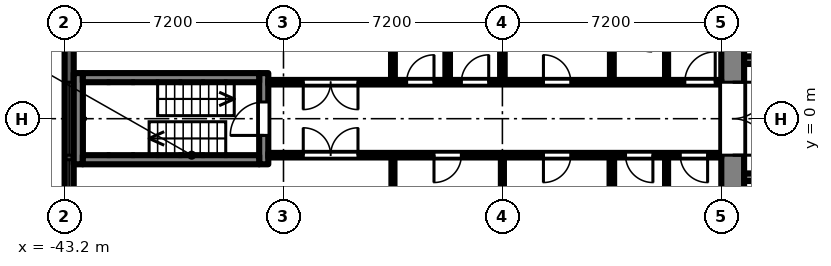
"""IFC4 building model, lengths in metres.
Left out: names, types, materials, properties, quantities, classifications, styles, units other than length and angle.
Written with IfcOpenShell. Run it as: python <this file> out.ifc"""

import sys

from ifc_helpers import new_model, si_unit, direction, frame, frame_2d, origin, place, context, subcontext, project, spatial, rectangle, extrude, element, fill, save


model = new_model("IFC4")
c1 = context("Model", 3, precision=1e-05, world=origin(), true_north=direction((0.0, 1.0)))
c2 = subcontext(c1, "Body", "Model", "MODEL_VIEW")
j1 = project(units=[si_unit("LENGTHUNIT", "METRE"), si_unit("PLANEANGLEUNIT", "RADIAN")], contexts=[c1])
p1 = place(None, origin())
s1 = spatial("IfcSite", under=j1, at=p1, CompositionType="ELEMENT")
p2 = place(p1, origin())
s2 = spatial("IfcBuilding", under=s1, at=p2, CompositionType="ELEMENT")
p3 = place(p2, frame((0.0, 0.0, 20.7)))
s3 = spatial("IfcBuildingStorey", under=s2, at=p3, CompositionType="ELEMENT", Elevation=20.7)
p4 = place(p3, frame((-43.05, 2.7, 0.0), z_axis=(0.0, 0.0, 1.0), x_axis=(0.0, -1.0, 0.0)))
e1 = element("IfcWall", 1, at=p4, inside=s3, PredefinedType="SOLIDWALL", context=c2, shape_type="SweptSolid", body=[
    extrude(rectangle(XDim=5.4, YDim=0.3, at=frame_2d((2.7, 0.0))), origin(), (0.0, 0.0, 1.0), 2.1),
])
p5 = place(p4, frame((1.5, 0.0, 0.2)))
e2 = element("IfcOpeningElement", 2, at=p5, cuts=e1, PredefinedType="OPENING", context=c2, shape_type="SweptSolid", body=[
    extrude(rectangle(XDim=2.4, YDim=1.85, at=frame_2d((1.2, 0.925))), frame((0.0, 0.16, 0.0), z_axis=(0.0, -1.0, 0.0), x_axis=(1.0, 0.0, 0.0)), (0.0, 0.0, 1.0), 0.32),
])
p6 = place(p4, frame((4.05, 0.0, 0.2)))
e3 = element("IfcOpeningElement", 3, at=p6, cuts=e1, PredefinedType="OPENING", context=c2, shape_type="SweptSolid", body=[
    extrude(rectangle(XDim=1.2, YDim=1.85, at=frame_2d((0.6, 0.925))), frame((0.0, 0.16, 0.0), z_axis=(0.0, -1.0, 0.0), x_axis=(1.0, 0.0, 0.0)), (0.0, 0.0, 1.0), 0.32),
])
p7 = place(p3, frame((-21.225, -7.2, 0.0), z_axis=(0.0, 0.0, 1.0), x_axis=(0.0, 1.0, 0.0)))
e4 = element("IfcWall", 4, at=p7, inside=s3, PredefinedType="SHEAR", context=c2, shape_type="SweptSolid", body=[
    extrude(rectangle(XDim=14.4, YDim=0.75, at=frame_2d((7.2, 0.0))), origin(), (0.0, 0.0, 1.0), 2.575),
])
p8 = place(p7, frame((6.0, 0.0, 0.0)))
e5 = element("IfcOpeningElement", 5, at=p8, cuts=e4, PredefinedType="OPENING", context=c2, shape_type="SweptSolid", body=[
    extrude(rectangle(XDim=2.4, YDim=2.2, at=frame_2d((1.2, 1.1))), frame((0.0, 0.385, 0.0), z_axis=(0.0, -1.0, 0.0), x_axis=(1.0, 0.0, 0.0)), (0.0, 0.0, 1.0), 0.77),
])
p9 = place(p3, frame((-7.9, 1.925, 0.0), z_axis=(0.0, 0.0, 1.0), x_axis=(-1.0, 0.0, 0.0)))
e6 = element("IfcWall", 6, at=p9, inside=s3, PredefinedType="SHEAR", context=c2, shape_type="SweptSolid", body=[
    extrude(rectangle(XDim=12.95, YDim=0.25, at=frame_2d((6.475, 0.0))), origin(), (0.0, 0.0, 1.0), 2.575),
])
p10 = place(p9, frame((0.525, 0.0, 0.0)))
e7 = element("IfcOpeningElement", 7, at=p10, cuts=e6, PredefinedType="OPENING", context=c2, shape_type="SweptSolid", body=[
    extrude(rectangle(XDim=0.9, YDim=2.1, at=frame_2d((0.45, 1.05))), frame((0.0, 0.135, 0.0), z_axis=(0.0, -1.0, 0.0), x_axis=(1.0, 0.0, 0.0)), (0.0, 0.0, 1.0), 0.27),
])
p11 = place(p9, frame((2.625, 0.0, 0.0)))
e8 = element("IfcOpeningElement", 8, at=p11, cuts=e6, PredefinedType="OPENING", context=c2, shape_type="SweptSolid", body=[
    extrude(rectangle(XDim=1.1, YDim=2.1, at=frame_2d((0.55, 1.05))), frame((0.0, 0.135, 0.0), z_axis=(0.0, -1.0, 0.0), x_axis=(1.0, 0.0, 0.0)), (0.0, 0.0, 1.0), 0.27),
])
p12 = place(p9, frame((4.925, 0.0, 0.0)))
e9 = element("IfcOpeningElement", 9, at=p12, cuts=e6, PredefinedType="OPENING", context=c2, shape_type="SweptSolid", body=[
    extrude(rectangle(XDim=0.9, YDim=2.1, at=frame_2d((0.45, 1.05))), frame((0.0, 0.135, 0.0), z_axis=(0.0, -1.0, 0.0), x_axis=(1.0, 0.0, 0.0)), (0.0, 0.0, 1.0), 0.27),
])
p13 = place(p9, frame((8.225, 0.0, 0.0)))
e10 = element("IfcOpeningElement", 10, at=p13, cuts=e6, PredefinedType="OPENING", context=c2, shape_type="SweptSolid", body=[
    extrude(rectangle(XDim=0.9, YDim=2.1, at=frame_2d((0.45, 1.05))), frame((0.0, 0.135, 0.0), z_axis=(0.0, -1.0, 0.0), x_axis=(1.0, 0.0, 0.0)), (0.0, 0.0, 1.0), 0.27),
])
p14 = place(p3, frame((-7.9, -1.925, 0.0), z_axis=(0.0, 0.0, 1.0), x_axis=(-1.0, 0.0, 0.0)))
e11 = element("IfcWall", 11, at=p14, inside=s3, PredefinedType="SHEAR", context=c2, shape_type="SweptSolid", body=[
    extrude(rectangle(XDim=12.95, YDim=0.25, at=frame_2d((6.475, 0.0))), origin(), (0.0, 0.0, 1.0), 2.575),
])
p15 = place(p14, frame((4.825, 0.0, 0.0)))
e12 = element("IfcOpeningElement", 12, at=p15, cuts=e11, PredefinedType="OPENING", context=c2, shape_type="SweptSolid", body=[
    extrude(rectangle(XDim=1.1, YDim=2.1, at=frame_2d((0.55, 1.05))), frame((0.0, 0.135, 0.0), z_axis=(0.0, -1.0, 0.0), x_axis=(1.0, 0.0, 0.0)), (0.0, 0.0, 1.0), 0.27),
])
p16 = place(p14, frame((7.025, 0.0, 0.0)))
e13 = element("IfcOpeningElement", 13, at=p16, cuts=e11, PredefinedType="OPENING", context=c2, shape_type="SweptSolid", body=[
    extrude(rectangle(XDim=1.1, YDim=2.1, at=frame_2d((0.55, 1.05))), frame((0.0, 0.135, 0.0), z_axis=(0.0, -1.0, 0.0), x_axis=(1.0, 0.0, 0.0)), (0.0, 0.0, 1.0), 0.27),
])
p17 = place(p14, frame((9.225, 0.0, 0.0)))
e14 = element("IfcOpeningElement", 14, at=p17, cuts=e11, PredefinedType="OPENING", context=c2, shape_type="SweptSolid", body=[
    extrude(rectangle(XDim=1.1, YDim=2.1, at=frame_2d((0.55, 1.05))), frame((0.0, 0.135, 0.0), z_axis=(0.0, -1.0, 0.0), x_axis=(1.0, 0.0, 0.0)), (0.0, 0.0, 1.0), 0.27),
])
p18 = place(p14, frame((0.525, 0.0, 0.0)))
e15 = element("IfcOpeningElement", 15, at=p18, cuts=e11, PredefinedType="OPENING", context=c2, shape_type="SweptSolid", body=[
    extrude(rectangle(XDim=0.9, YDim=2.1, at=frame_2d((0.45, 1.05))), frame((0.0, 0.135, 0.0), z_axis=(0.0, -1.0, 0.0), x_axis=(1.0, 0.0, 0.0)), (0.0, 0.0, 1.0), 0.27),
])
p19 = place(p14, frame((2.625, 0.0, 0.0)))
e16 = element("IfcOpeningElement", 16, at=p19, cuts=e11, PredefinedType="OPENING", context=c2, shape_type="SweptSolid", body=[
    extrude(rectangle(XDim=1.1, YDim=2.1, at=frame_2d((0.55, 1.05))), frame((0.0, 0.135, 0.0), z_axis=(0.0, -1.0, 0.0), x_axis=(1.0, 0.0, 0.0)), (0.0, 0.0, 1.0), 0.27),
])
p20 = place(p3, frame((-36.65, -1.5, 0.0), z_axis=(0.0, 0.0, 1.0), x_axis=(0.0, 1.0, 0.0)))
e17 = element("IfcWall", 17, at=p20, inside=s3, PredefinedType="SHEAR", context=c2, shape_type="SweptSolid", body=[
    extrude(rectangle(XDim=3.0, YDim=0.3, at=frame_2d((1.5, 0.0))), origin(), (0.0, 0.0, 1.0), 2.575),
])
p21 = place(p20, frame((0.95, 0.0, 0.0)))
e18 = element("IfcOpeningElement", 18, at=p21, cuts=e17, PredefinedType="OPENING", context=c2, shape_type="SweptSolid", body=[
    extrude(rectangle(XDim=1.1, YDim=2.1, at=frame_2d((0.55, 1.05))), frame((0.0, 0.16, 0.0), z_axis=(0.0, -1.0, 0.0), x_axis=(1.0, 0.0, 0.0)), (0.0, 0.0, 1.0), 0.32),
])
p22 = place(p3, frame((-42.75, -1.5, 0.0), z_axis=(0.0, 0.0, 1.0), x_axis=(0.0, 1.0, 0.0)))
e19 = element("IfcWall", 19, at=p22, inside=s3, PredefinedType="SHEAR", context=c2, shape_type="SweptSolid", body=[
    extrude(rectangle(XDim=3.0, YDim=0.3, at=frame_2d((1.5, 0.0))), origin(), (0.0, 0.0, 1.0), 2.575),
])
for number, where, z_axis, x_axis in (
    (20, (-36.8, -1.35, 0.0), (0.0, 0.0, 1.0), (-1.0, 0.0, 0.0)),
    (21, (-36.8, 1.35, 0.0), (0.0, 0.0, 1.0), (-1.0, 0.0, 0.0)),
):
    element("IfcWall", number, at=place(p3, frame(where, z_axis=z_axis, x_axis=x_axis)), inside=s3, PredefinedType="SHEAR", context=c2, shape_type="SweptSolid", body=[
        extrude(rectangle(XDim=5.8, YDim=0.3, at=frame_2d((2.9, 0.0))), origin(), (0.0, 0.0, 1.0), 2.575),
    ])
p23 = place(p3, frame((-36.5, -1.2, 0.0), z_axis=(0.0, 0.0, 1.0), x_axis=(1.0, 0.0, 0.0)))
e22 = element("IfcWall", 22, at=p23, inside=s3, PredefinedType="PARTITIONING", context=c2, shape_type="SweptSolid", body=[
    extrude(rectangle(XDim=14.9, YDim=0.15, at=frame_2d((7.45, 0.0))), origin(), (0.0, 0.0, 1.0), 2.575),
])
p24 = place(p23, frame((13.55, 0.0, 0.0)))
e23 = element("IfcOpeningElement", 23, at=p24, cuts=e22, PredefinedType="OPENING", context=c2, shape_type="SweptSolid", body=[
    extrude(rectangle(XDim=0.9, YDim=2.1, at=frame_2d((0.45, 1.05))), frame((0.0, 0.085, 0.0), z_axis=(0.0, -1.0, 0.0), x_axis=(1.0, 0.0, 0.0)), (0.0, 0.0, 1.0), 0.17),
])
p25 = place(p23, frame((11.75, 0.0, 0.0)))
e24 = element("IfcOpeningElement", 24, at=p25, cuts=e22, PredefinedType="OPENING", context=c2, shape_type="SweptSolid", body=[
    extrude(rectangle(XDim=0.9, YDim=2.1, at=frame_2d((0.45, 1.05))), frame((0.0, 0.085, 0.0), z_axis=(0.0, -1.0, 0.0), x_axis=(1.0, 0.0, 0.0)), (0.0, 0.0, 1.0), 0.17),
])
p26 = place(p23, frame((9.05, 0.0, 0.0)))
e25 = element("IfcOpeningElement", 25, at=p26, cuts=e22, PredefinedType="OPENING", context=c2, shape_type="SweptSolid", body=[
    extrude(rectangle(XDim=0.9, YDim=2.1, at=frame_2d((0.45, 1.05))), frame((0.0, 0.085, 0.0), z_axis=(0.0, -1.0, 0.0), x_axis=(1.0, 0.0, 0.0)), (0.0, 0.0, 1.0), 0.17),
])
p27 = place(p23, frame((5.45, 0.0, 0.0)))
e26 = element("IfcOpeningElement", 26, at=p27, cuts=e22, PredefinedType="OPENING", context=c2, shape_type="SweptSolid", body=[
    extrude(rectangle(XDim=0.9, YDim=2.1, at=frame_2d((0.45, 1.05))), frame((0.0, 0.085, 0.0), z_axis=(0.0, -1.0, 0.0), x_axis=(1.0, 0.0, 0.0)), (0.0, 0.0, 1.0), 0.17),
])
p28 = place(p23, frame((1.15, 0.0, 0.0)))
e27 = element("IfcOpeningElement", 27, at=p28, cuts=e22, PredefinedType="OPENING", context=c2, shape_type="SweptSolid", body=[
    extrude(rectangle(XDim=1.8, YDim=2.1, at=frame_2d((0.9, 1.05))), frame((0.0, 0.085, 0.0), z_axis=(0.0, -1.0, 0.0), x_axis=(1.0, 0.0, 0.0)), (0.0, 0.0, 1.0), 0.17),
])
p29 = place(p3, frame((-36.5, 1.2, 0.0), z_axis=(0.0, 0.0, 1.0), x_axis=(1.0, 0.0, 0.0)))
e28 = element("IfcWall", 28, at=p29, inside=s3, PredefinedType="PARTITIONING", context=c2, shape_type="SweptSolid", body=[
    extrude(rectangle(XDim=14.9, YDim=0.15, at=frame_2d((7.45, 0.0))), origin(), (0.0, 0.0, 1.0), 2.575),
])
p30 = place(p29, frame((13.7, 0.0, 0.0)))
e29 = element("IfcOpeningElement", 29, at=p30, cuts=e28, PredefinedType="OPENING", context=c2, shape_type="SweptSolid", body=[
    extrude(rectangle(XDim=1.0, YDim=2.1, at=frame_2d((0.5, 1.05))), frame((0.0, 0.085, 0.0), z_axis=(0.0, -1.0, 0.0), x_axis=(1.0, 0.0, 0.0)), (0.0, 0.0, 1.0), 0.17),
])
p31 = place(p29, frame((9.05, 0.0, 0.0)))
e30 = element("IfcOpeningElement", 30, at=p31, cuts=e28, PredefinedType="OPENING", context=c2, shape_type="SweptSolid", body=[
    extrude(rectangle(XDim=0.9, YDim=2.1, at=frame_2d((0.45, 1.05))), frame((0.0, 0.085, 0.0), z_axis=(0.0, -1.0, 0.0), x_axis=(1.0, 0.0, 0.0)), (0.0, 0.0, 1.0), 0.17),
])
p32 = place(p29, frame((6.35, 0.0, 0.0)))
e31 = element("IfcOpeningElement", 31, at=p32, cuts=e28, PredefinedType="OPENING", context=c2, shape_type="SweptSolid", body=[
    extrude(rectangle(XDim=0.9, YDim=2.1, at=frame_2d((0.45, 1.05))), frame((0.0, 0.085, 0.0), z_axis=(0.0, -1.0, 0.0), x_axis=(1.0, 0.0, 0.0)), (0.0, 0.0, 1.0), 0.17),
])
p33 = place(p29, frame((4.55, 0.0, 0.0)))
e32 = element("IfcOpeningElement", 32, at=p33, cuts=e28, PredefinedType="OPENING", context=c2, shape_type="SweptSolid", body=[
    extrude(rectangle(XDim=0.9, YDim=2.1, at=frame_2d((0.45, 1.05))), frame((0.0, 0.085, 0.0), z_axis=(0.0, -1.0, 0.0), x_axis=(1.0, 0.0, 0.0)), (0.0, 0.0, 1.0), 0.17),
])
p34 = place(p29, frame((1.15, 0.0, 0.0)))
e33 = element("IfcOpeningElement", 33, at=p34, cuts=e28, PredefinedType="OPENING", context=c2, shape_type="SweptSolid", body=[
    extrude(rectangle(XDim=1.8, YDim=2.1, at=frame_2d((0.9, 1.05))), frame((0.0, 0.085, 0.0), z_axis=(0.0, -1.0, 0.0), x_axis=(1.0, 0.0, 0.0)), (0.0, 0.0, 1.0), 0.17),
])
p35 = place(p3, frame((-32.4, -6.9, 0.0), z_axis=(0.0, 0.0, 1.0), x_axis=(0.0, 1.0, 0.0)))
e34 = element("IfcWall", 34, at=p35, inside=s3, PredefinedType="PARTITIONING", context=c2, shape_type="SweptSolid", body=[
    extrude(rectangle(XDim=5.625, YDim=0.1, at=frame_2d((2.812, 0.0))), origin(), (0.0, 0.0, 1.0), 2.575),
])
p36 = place(p3, frame((-32.4, 1.275, 0.0), z_axis=(0.0, 0.0, 1.0), x_axis=(0.0, 1.0, 0.0)))
e35 = element("IfcWall", 35, at=p36, inside=s3, PredefinedType="PARTITIONING", context=c2, shape_type="SweptSolid", body=[
    extrude(rectangle(XDim=5.625, YDim=0.125, at=frame_2d((2.812, 0.0))), origin(), (0.0, 0.0, 1.0), 2.575),
])
p37 = place(p3, frame((-30.6, 1.275, 0.0), z_axis=(0.0, 0.0, 1.0), x_axis=(0.0, 1.0, 0.0)))
e36 = element("IfcWall", 36, at=p37, inside=s3, PredefinedType="PARTITIONING", context=c2, shape_type="SweptSolid", body=[
    extrude(rectangle(XDim=5.625, YDim=0.15, at=frame_2d((2.812, 0.0))), origin(), (0.0, 0.0, 1.0), 2.575),
])
p38 = place(p3, frame((-28.8, -6.9, 0.0), z_axis=(0.0, 0.0, 1.0), x_axis=(0.0, 1.0, 0.0)))
e37 = element("IfcWall", 37, at=p38, inside=s3, PredefinedType="PARTITIONING", context=c2, shape_type="SweptSolid", body=[
    extrude(rectangle(XDim=5.625, YDim=0.1, at=frame_2d((2.812, 0.0))), origin(), (0.0, 0.0, 1.0), 2.575),
])
for number, where, z_axis, x_axis in (
    (38, (-28.8, 1.275, 0.0), (0.0, 0.0, 1.0), (0.0, 1.0, 0.0)),
    (39, (-25.2, -6.9, 0.0), (0.0, 0.0, 1.0), (0.0, 1.0, 0.0)),
):
    element("IfcWall", number, at=place(p3, frame(where, z_axis=z_axis, x_axis=x_axis)), inside=s3, PredefinedType="PARTITIONING", context=c2, shape_type="SweptSolid", body=[
        extrude(rectangle(XDim=5.625, YDim=0.15, at=frame_2d((2.812, 0.0))), origin(), (0.0, 0.0, 1.0), 2.575),
    ])
p39 = place(p3, frame((-25.2, 1.275, 0.0), z_axis=(0.0, 0.0, 1.0), x_axis=(0.0, 1.0, 0.0)))
e40 = element("IfcWall", 40, at=p39, inside=s3, PredefinedType="PARTITIONING", context=c2, shape_type="SweptSolid", body=[
    extrude(rectangle(XDim=1.725, YDim=0.125, at=frame_2d((0.863, 0.0))), origin(), (0.0, 0.0, 1.0), 2.575),
])
p40 = place(p3, frame((-23.4, -6.9, 0.0), z_axis=(0.0, 0.0, 1.0), x_axis=(0.0, 1.0, 0.0)))
e41 = element("IfcWall", 41, at=p40, inside=s3, PredefinedType="PARTITIONING", context=c2, shape_type="SweptSolid", body=[
    extrude(rectangle(XDim=5.625, YDim=0.1, at=frame_2d((2.812, 0.0))), origin(), (0.0, 0.0, 1.0), 2.575),
])
p41 = place(p3, frame((-23.4, 1.275, 0.0), z_axis=(0.0, 0.0, 1.0), x_axis=(0.0, 1.0, 0.0)))
e42 = element("IfcWall", 42, at=p41, inside=s3, PredefinedType="PARTITIONING", context=c2, shape_type="SweptSolid", body=[
    extrude(rectangle(XDim=1.675, YDim=0.1, at=frame_2d((0.837, 0.0))), origin(), (0.0, 0.0, 1.0), 2.575),
])
p42 = place(p5, origin())
e43 = element("IfcWindow", 43, at=p42, inside=s3, PartitioningType="SINGLE_PANEL", PredefinedType="WINDOW", context=c2, shape_type="SweptSolid", body=[
    extrude(rectangle(XDim=2.4, YDim=1.85, at=frame_2d((1.2, 0.925))), frame((0.0, 0.03, 0.0), z_axis=(0.0, -1.0, 0.0), x_axis=(1.0, 0.0, 0.0)), (0.0, 0.0, 1.0), 0.06),
])
fill(e2, e43)
p43 = place(p6, origin())
e44 = element("IfcWindow", 44, at=p43, inside=s3, PartitioningType="SINGLE_PANEL", PredefinedType="WINDOW", context=c2, shape_type="SweptSolid", body=[
    extrude(rectangle(XDim=1.2, YDim=1.85, at=frame_2d((0.6, 0.925))), frame((0.0, 0.03, 0.0), z_axis=(0.0, -1.0, 0.0), x_axis=(1.0, 0.0, 0.0)), (0.0, 0.0, 1.0), 0.06),
])
fill(e3, e44)
p44 = place(p8, frame((2.4, 0.0, 0.0), z_axis=(0.0, 0.0, 1.0), x_axis=(-1.0, 0.0, 0.0)))
e45 = element("IfcDoor", 45, at=p44, inside=s3, OperationType="DOUBLE_DOOR_DOUBLE_SWING", PredefinedType="DOOR", context=c2, shape_type="SweptSolid", body=[
    extrude(rectangle(XDim=2.4, YDim=2.2, at=frame_2d((1.2, 1.1))), frame((0.0, 0.025, 0.0), z_axis=(0.0, -1.0, 0.0), x_axis=(1.0, 0.0, 0.0)), (0.0, 0.0, 1.0), 0.05),
])
fill(e5, e45)
p45 = place(p21, origin())
e46 = element("IfcDoor", 46, at=p45, inside=s3, OperationType="SINGLE_SWING_LEFT", PredefinedType="DOOR", context=c2, shape_type="SweptSolid", body=[
    extrude(rectangle(XDim=1.1, YDim=2.1, at=frame_2d((0.55, 1.05))), frame((0.0, 0.025, 0.0), z_axis=(0.0, -1.0, 0.0), x_axis=(1.0, 0.0, 0.0)), (0.0, 0.0, 1.0), 0.05),
])
fill(e18, e46)
p46 = place(p24, frame((0.9, 0.0, 0.0), z_axis=(0.0, 0.0, 1.0), x_axis=(-1.0, 0.0, 0.0)))
e47 = element("IfcDoor", 47, at=p46, inside=s3, OperationType="SINGLE_SWING_LEFT", PredefinedType="DOOR", context=c2, shape_type="SweptSolid", body=[
    extrude(rectangle(XDim=0.9, YDim=2.1, at=frame_2d((0.45, 1.05))), frame((0.0, 0.025, 0.0), z_axis=(0.0, -1.0, 0.0), x_axis=(1.0, 0.0, 0.0)), (0.0, 0.0, 1.0), 0.05),
])
fill(e23, e47)
p47 = place(p25, frame((0.9, 0.0, 0.0), z_axis=(0.0, 0.0, 1.0), x_axis=(-1.0, 0.0, 0.0)))
e48 = element("IfcDoor", 48, at=p47, inside=s3, OperationType="SINGLE_SWING_LEFT", PredefinedType="DOOR", context=c2, shape_type="SweptSolid", body=[
    extrude(rectangle(XDim=0.9, YDim=2.1, at=frame_2d((0.45, 1.05))), frame((0.0, 0.025, 0.0), z_axis=(0.0, -1.0, 0.0), x_axis=(1.0, 0.0, 0.0)), (0.0, 0.0, 1.0), 0.05),
])
fill(e24, e48)
p48 = place(p26, frame((0.9, 0.0, 0.0), z_axis=(0.0, 0.0, 1.0), x_axis=(-1.0, 0.0, 0.0)))
e49 = element("IfcDoor", 49, at=p48, inside=s3, OperationType="SINGLE_SWING_RIGHT", PredefinedType="DOOR", context=c2, shape_type="SweptSolid", body=[
    extrude(rectangle(XDim=0.9, YDim=2.1, at=frame_2d((0.45, 1.05))), frame((0.0, 0.025, 0.0), z_axis=(0.0, -1.0, 0.0), x_axis=(1.0, 0.0, 0.0)), (0.0, 0.0, 1.0), 0.05),
])
fill(e25, e49)
p49 = place(p27, frame((0.9, 0.0, 0.0), z_axis=(0.0, 0.0, 1.0), x_axis=(-1.0, 0.0, 0.0)))
e50 = element("IfcDoor", 50, at=p49, inside=s3, OperationType="SINGLE_SWING_RIGHT", PredefinedType="DOOR", context=c2, shape_type="SweptSolid", body=[
    extrude(rectangle(XDim=0.9, YDim=2.1, at=frame_2d((0.45, 1.05))), frame((0.0, 0.025, 0.0), z_axis=(0.0, -1.0, 0.0), x_axis=(1.0, 0.0, 0.0)), (0.0, 0.0, 1.0), 0.05),
])
fill(e26, e50)
p50 = place(p28, origin())
e51 = element("IfcDoor", 51, at=p50, inside=s3, OperationType="DOUBLE_DOOR_DOUBLE_SWING", PredefinedType="DOOR", context=c2, shape_type="SweptSolid", body=[
    extrude(rectangle(XDim=1.8, YDim=2.1, at=frame_2d((0.9, 1.05))), frame((0.0, 0.025, 0.0), z_axis=(0.0, -1.0, 0.0), x_axis=(1.0, 0.0, 0.0)), (0.0, 0.0, 1.0), 0.05),
])
fill(e27, e51)
p51 = place(p30, origin())
e52 = element("IfcDoor", 52, at=p51, inside=s3, OperationType="SINGLE_SWING_RIGHT", PredefinedType="DOOR", context=c2, shape_type="SweptSolid", body=[
    extrude(rectangle(XDim=1.0, YDim=2.1, at=frame_2d((0.5, 1.05))), frame((0.0, 0.025, 0.0), z_axis=(0.0, -1.0, 0.0), x_axis=(1.0, 0.0, 0.0)), (0.0, 0.0, 1.0), 0.05),
])
fill(e29, e52)
p52 = place(p31, origin())
e53 = element("IfcDoor", 53, at=p52, inside=s3, OperationType="SINGLE_SWING_LEFT", PredefinedType="DOOR", context=c2, shape_type="SweptSolid", body=[
    extrude(rectangle(XDim=0.9, YDim=2.1, at=frame_2d((0.45, 1.05))), frame((0.0, 0.025, 0.0), z_axis=(0.0, -1.0, 0.0), x_axis=(1.0, 0.0, 0.0)), (0.0, 0.0, 1.0), 0.05),
])
fill(e30, e53)
p53 = place(p32, origin())
e54 = element("IfcDoor", 54, at=p53, inside=s3, OperationType="SINGLE_SWING_RIGHT", PredefinedType="DOOR", context=c2, shape_type="SweptSolid", body=[
    extrude(rectangle(XDim=0.9, YDim=2.1, at=frame_2d((0.45, 1.05))), frame((0.0, 0.025, 0.0), z_axis=(0.0, -1.0, 0.0), x_axis=(1.0, 0.0, 0.0)), (0.0, 0.0, 1.0), 0.05),
])
fill(e31, e54)
p54 = place(p33, origin())
e55 = element("IfcDoor", 55, at=p54, inside=s3, OperationType="SINGLE_SWING_RIGHT", PredefinedType="DOOR", context=c2, shape_type="SweptSolid", body=[
    extrude(rectangle(XDim=0.9, YDim=2.1, at=frame_2d((0.45, 1.05))), frame((0.0, 0.025, 0.0), z_axis=(0.0, -1.0, 0.0), x_axis=(1.0, 0.0, 0.0)), (0.0, 0.0, 1.0), 0.05),
])
fill(e32, e55)
p55 = place(p34, frame((1.8, 0.0, 0.0), z_axis=(0.0, 0.0, 1.0), x_axis=(-1.0, 0.0, 0.0)))
e56 = element("IfcDoor", 56, at=p55, inside=s3, OperationType="DOUBLE_DOOR_DOUBLE_SWING", PredefinedType="DOOR", context=c2, shape_type="SweptSolid", body=[
    extrude(rectangle(XDim=1.8, YDim=2.1, at=frame_2d((0.9, 1.05))), frame((0.0, 0.025, 0.0), z_axis=(0.0, -1.0, 0.0), x_axis=(1.0, 0.0, 0.0)), (0.0, 0.0, 1.0), 0.05),
])
fill(e33, e56)
save(model, sys.argv[1])
